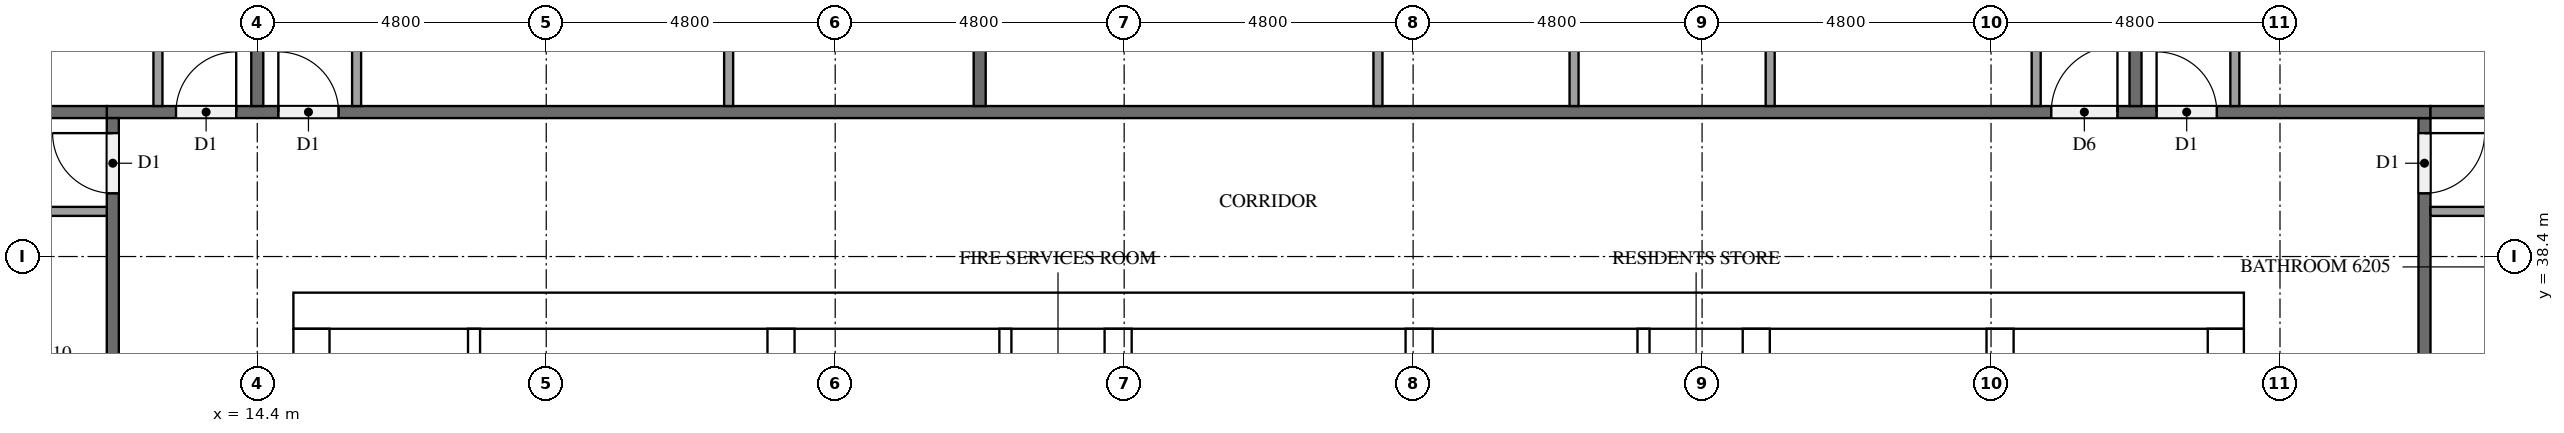
"""IFC4 building model, lengths in metres.
Left out: names, types, materials, properties, quantities, classifications, styles, units other than length and angle.
Written with IfcOpenShell. Run it as: python <this file> out.ifc"""

import sys

from ifc_helpers import new_model, si_unit, direction, frame, frame_2d, origin, place, context, subcontext, project, spatial, rectangle, extrude, element, fill, save


model = new_model("IFC4")
c1 = context("Model", 3, precision=1e-05, world=origin(), true_north=direction((0.0, 1.0)))
c2 = subcontext(c1, "Body", "Model", "MODEL_VIEW")
j1 = project(units=[si_unit("LENGTHUNIT", "METRE"), si_unit("PLANEANGLEUNIT", "RADIAN")], contexts=[c1])
p1 = place(None, origin())
s1 = spatial("IfcSite", under=j1, at=p1, CompositionType="ELEMENT")
p2 = place(p1, origin())
s2 = spatial("IfcBuilding", under=s1, at=p2, CompositionType="ELEMENT")
p3 = place(p2, frame((0.0, 0.0, 238.7)))
s3 = spatial("IfcBuildingStorey", under=s2, at=p3, CompositionType="ELEMENT", Elevation=238.7)
p4 = place(p3, frame((15.0, 37.5, 0.0), z_axis=(0.0, 0.0, 1.0), x_axis=(1.0, 0.0, 0.0)))
e1 = element("IfcWall", 1, at=p4, inside=s3, PredefinedType="SHEAR", context=c2, shape_type="SweptSolid", body=[
    extrude(rectangle(XDim=32.4, YDim=0.6, at=frame_2d((16.2, 0.0))), origin(), (0.0, 0.0, 1.0), 3.2),
])
p5 = place(p4, frame((15.3, 0.0, 0.0)))
e2 = element("IfcOpeningElement", 2, at=p5, cuts=e1, PredefinedType="OPENING", context=c2, shape_type="SweptSolid", body=[
    extrude(rectangle(XDim=1.8, YDim=2.1, at=frame_2d((0.9, 1.05))), frame((0.0, 0.31, 0.0), z_axis=(0.0, -1.0, 0.0), x_axis=(1.0, 0.0, 0.0)), (0.0, 0.0, 1.0), 0.62),
])
p6 = place(p4, frame((1.25, 0.0, 0.0)))
e3 = element("IfcOpeningElement", 3, at=p6, cuts=e1, PredefinedType="OPENING", context=c2, shape_type="SweptSolid", body=[
    extrude(rectangle(XDim=1.0, YDim=2.1, at=frame_2d((0.5, 1.05))), frame((0.0, 0.31, 0.0), z_axis=(0.0, -1.0, 0.0), x_axis=(1.0, 0.0, 0.0)), (0.0, 0.0, 1.0), 0.62),
])
p7 = place(p4, frame((4.988, 0.0, 0.0)))
e4 = element("IfcOpeningElement", 4, at=p7, cuts=e1, PredefinedType="OPENING", context=c2, shape_type="SweptSolid", body=[
    extrude(rectangle(XDim=1.0, YDim=2.1, at=frame_2d((0.5, 1.05))), frame((0.0, 0.31, 0.0), z_axis=(0.0, -1.0, 0.0), x_axis=(1.0, 0.0, 0.0)), (0.0, 0.0, 1.0), 0.62),
])
p8 = place(p3, frame((15.3, 15.6, 0.0), z_axis=(0.0, 0.0, 1.0), x_axis=(0.0, 1.0, 0.0)))
e5 = element("IfcWall", 5, at=p8, inside=s3, PredefinedType="SHEAR", context=c2, shape_type="SweptSolid", body=[
    extrude(rectangle(XDim=21.6, YDim=0.6, at=frame_2d((10.8, 0.0))), origin(), (0.0, 0.0, 1.0), 3.2),
])
p9 = place(p8, frame((5.16, 0.0, 0.0)))
e6 = element("IfcOpeningElement", 6, at=p9, cuts=e5, PredefinedType="OPENING", context=c2, shape_type="SweptSolid", body=[
    extrude(rectangle(XDim=1.2, YDim=2.1, at=frame_2d((0.6, 1.05))), frame((0.0, 0.31, 0.0), z_axis=(0.0, -1.0, 0.0), x_axis=(1.0, 0.0, 0.0)), (0.0, 0.0, 1.0), 0.62),
])
p10 = place(p3, frame((47.1, 15.6, 0.0), z_axis=(0.0, 0.0, 1.0), x_axis=(0.0, 1.0, 0.0)))
e7 = element("IfcWall", 7, at=p10, inside=s3, PredefinedType="SHEAR", context=c2, shape_type="SweptSolid", body=[
    extrude(rectangle(XDim=21.6, YDim=0.6, at=frame_2d((10.8, 0.0))), origin(), (0.0, 0.0, 1.0), 3.2),
])
p11 = place(p10, frame((10.5, 0.0, 0.0)))
e8 = element("IfcOpeningElement", 8, at=p11, cuts=e7, PredefinedType="OPENING", context=c2, shape_type="SweptSolid", body=[
    extrude(rectangle(XDim=1.2, YDim=2.1, at=frame_2d((0.6, 1.05))), frame((0.0, 0.31, 0.0), z_axis=(0.0, -1.0, 0.0), x_axis=(1.0, 0.0, 0.0)), (0.0, 0.0, 1.0), 0.62),
])
p12 = place(p3, frame((23.1, 15.6, 0.0), z_axis=(0.0, 0.0, 1.0), x_axis=(0.0, 1.0, 0.0)))
e9 = element("IfcWall", 9, at=p12, inside=s3, PredefinedType="SHEAR", context=c2, shape_type="SweptSolid", body=[
    extrude(rectangle(XDim=21.6, YDim=0.45, at=frame_2d((10.8, 0.0))), origin(), (0.0, 0.0, 1.0), 3.2),
])
p13 = place(p3, frame((39.3, 27.75, 0.0), z_axis=(0.0, 0.0, 1.0), x_axis=(0.0, 1.0, 0.0)))
e10 = element("IfcWall", 10, at=p13, inside=s3, PredefinedType="SHEAR", context=c2, shape_type="SweptSolid", body=[
    extrude(rectangle(XDim=9.45, YDim=0.45, at=frame_2d((4.725, 0.0))), origin(), (0.0, 0.0, 1.0), 3.2),
])
p14 = place(p3, frame((43.35, 27.75, 0.0), z_axis=(0.0, 0.0, 1.0), x_axis=(0.0, 1.0, 0.0)))
e11 = element("IfcWall", 11, at=p14, inside=s3, PredefinedType="SHEAR", context=c2, shape_type="SweptSolid", body=[
    extrude(rectangle(XDim=9.45, YDim=0.45, at=frame_2d((4.725, 0.0))), origin(), (0.0, 0.0, 1.0), 3.2),
])
p15 = place(p14, frame((7.65, 0.0, 0.0)))
e12 = element("IfcOpeningElement", 12, at=p15, cuts=e11, PredefinedType="OPENING", context=c2, shape_type="SweptSolid", body=[
    extrude(rectangle(XDim=1.2, YDim=2.1, at=frame_2d((0.6, 1.05))), frame((0.0, 0.235, 0.0), z_axis=(0.0, -1.0, 0.0), x_axis=(1.0, 0.0, 0.0)), (0.0, 0.0, 1.0), 0.47),
])
for number, where, z_axis, x_axis in (
    (13, (28.7, 33.775, 0.0), (0.0, 0.0, 1.0), (0.0, 1.0, 0.0)),
    (14, (33.7, 33.775, 0.0), (0.0, 0.0, 1.0), (0.0, 1.0, 0.0)),
):
    element("IfcWall", number, at=place(p3, frame(where, z_axis=z_axis, x_axis=x_axis)), inside=s3, PredefinedType="SHEAR", context=c2, shape_type="SweptSolid", body=[
        extrude(rectangle(XDim=3.425, YDim=0.45, at=frame_2d((1.712, 0.0))), origin(), (0.0, 0.0, 1.0), 3.2),
    ])
p16 = place(p3, frame((18.001, 31.475, 0.0), z_axis=(0.0, 0.0, 1.0), x_axis=(0.0, 1.0, 0.0)))
e15 = element("IfcWall", 15, at=p16, inside=s3, PredefinedType="PARTITIONING", context=c2, shape_type="SweptSolid", body=[
    extrude(rectangle(XDim=5.725, YDim=0.2, at=frame_2d((2.862, 0.0))), origin(), (0.0, 0.0, 1.0), 3.2),
])
for number, where, z_axis, x_axis in (
    (16, (26.827, 33.775, 0.0), (0.0, 0.0, 1.0), (0.0, 1.0, 0.0)),
    (17, (37.427, 33.775, 0.0), (0.0, 0.0, 1.0), (0.0, 1.0, 0.0)),
):
    element("IfcWall", number, at=place(p3, frame(where, z_axis=z_axis, x_axis=x_axis)), inside=s3, PredefinedType="PARTITIONING", context=c2, shape_type="SweptSolid", body=[
        extrude(rectangle(XDim=3.425, YDim=0.2, at=frame_2d((1.712, 0.0))), origin(), (0.0, 0.0, 1.0), 3.2),
    ])
p17 = place(p3, frame((50.4, 40.7, 0.0), z_axis=(0.0, 0.0, 1.0), x_axis=(0.0, -1.0, 0.0)))
e18 = element("IfcWall", 18, at=p17, inside=s3, PredefinedType="PARTITIONING", context=c2, shape_type="SweptSolid", body=[
    extrude(rectangle(XDim=28.6, YDim=0.2, at=frame_2d((14.3, 0.0))), origin(), (0.0, 0.0, 1.0), 3.2),
])
p18 = place(p17, frame((27.3, 0.0, 0.0)))
e19 = element("IfcOpeningElement", 19, at=p18, cuts=e18, PredefinedType="OPENING", context=c2, shape_type="SweptSolid", body=[
    extrude(rectangle(XDim=1.1, YDim=2.1, at=frame_2d((0.55, 1.05))), frame((0.0, 0.11, 0.0), z_axis=(0.0, -1.0, 0.0), x_axis=(1.0, 0.0, 0.0)), (0.0, 0.0, 1.0), 0.22),
])
p19 = place(p17, frame((0.25, 0.0, 0.0)))
e20 = element("IfcOpeningElement", 20, at=p19, cuts=e18, PredefinedType="OPENING", context=c2, shape_type="SweptSolid", body=[
    extrude(rectangle(XDim=1.0, YDim=2.1, at=frame_2d((0.5, 1.05))), frame((0.0, 0.11, 0.0), z_axis=(0.0, -1.0, 0.0), x_axis=(1.0, 0.0, 0.0)), (0.0, 0.0, 1.0), 0.22),
])
p20 = place(p3, frame((11.9, 40.8, 0.0), z_axis=(0.0, 0.0, 1.0), x_axis=(1.0, 0.0, 0.0)))
e21 = element("IfcWall", 21, at=p20, inside=s3, PredefinedType="PARTITIONING", context=c2, shape_type="SweptSolid", body=[
    extrude(rectangle(XDim=38.6, YDim=0.2, at=frame_2d((19.3, 0.0))), origin(), (0.0, 0.0, 1.0), 3.2),
])
p21 = place(p20, frame((34.05, 0.0, 0.0)))
e22 = element("IfcOpeningElement", 22, at=p21, cuts=e21, PredefinedType="OPENING", context=c2, shape_type="SweptSolid", body=[
    extrude(rectangle(XDim=1.0, YDim=2.1, at=frame_2d((0.5, 1.05))), frame((0.0, 0.11, 0.0), z_axis=(0.0, -1.0, 0.0), x_axis=(1.0, 0.0, 0.0)), (0.0, 0.0, 1.0), 0.22),
])
p22 = place(p20, frame((32.3, 0.0, 0.0)))
e23 = element("IfcOpeningElement", 23, at=p22, cuts=e21, PredefinedType="OPENING", context=c2, shape_type="SweptSolid", body=[
    extrude(rectangle(XDim=1.1, YDim=2.1, at=frame_2d((0.55, 1.05))), frame((0.0, 0.11, 0.0), z_axis=(0.0, -1.0, 0.0), x_axis=(1.0, 0.0, 0.0)), (0.0, 0.0, 1.0), 0.22),
])
p23 = place(p20, frame((2.85, 0.0, 0.0)))
e24 = element("IfcOpeningElement", 24, at=p23, cuts=e21, PredefinedType="OPENING", context=c2, shape_type="SweptSolid", body=[
    extrude(rectangle(XDim=1.0, YDim=2.1, at=frame_2d((0.5, 1.05))), frame((0.0, 0.11, 0.0), z_axis=(0.0, -1.0, 0.0), x_axis=(1.0, 0.0, 0.0)), (0.0, 0.0, 1.0), 0.22),
])
p24 = place(p20, frame((1.15, 0.0, 0.0)))
e25 = element("IfcOpeningElement", 25, at=p24, cuts=e21, PredefinedType="OPENING", context=c2, shape_type="SweptSolid", body=[
    extrude(rectangle(XDim=1.0, YDim=2.1, at=frame_2d((0.5, 1.05))), frame((0.0, 0.11, 0.0), z_axis=(0.0, -1.0, 0.0), x_axis=(1.0, 0.0, 0.0)), (0.0, 0.0, 1.0), 0.22),
])
p25 = place(p3, frame((12.0, 12.1, 0.0), z_axis=(0.0, 0.0, 1.0), x_axis=(0.0, 1.0, 0.0)))
e26 = element("IfcWall", 26, at=p25, inside=s3, PredefinedType="PARTITIONING", context=c2, shape_type="SweptSolid", body=[
    extrude(rectangle(XDim=28.6, YDim=0.2, at=frame_2d((14.3, 0.0))), origin(), (0.0, 0.0, 1.0), 3.2),
])
p26 = place(p25, frame((27.35, 0.0, 0.0)))
e27 = element("IfcOpeningElement", 27, at=p26, cuts=e26, PredefinedType="OPENING", context=c2, shape_type="SweptSolid", body=[
    extrude(rectangle(XDim=1.0, YDim=2.1, at=frame_2d((0.5, 1.05))), frame((0.0, 0.11, 0.0), z_axis=(0.0, -1.0, 0.0), x_axis=(1.0, 0.0, 0.0)), (0.0, 0.0, 1.0), 0.22),
])
p27 = place(p25, frame((17.75, 0.0, 0.0)))
e28 = element("IfcOpeningElement", 28, at=p27, cuts=e26, PredefinedType="OPENING", context=c2, shape_type="SweptSolid", body=[
    extrude(rectangle(XDim=1.0, YDim=2.1, at=frame_2d((0.5, 1.05))), frame((0.0, 0.11, 0.0), z_axis=(0.0, -1.0, 0.0), x_axis=(1.0, 0.0, 0.0)), (0.0, 0.0, 1.0), 0.22),
])
p28 = place(p25, frame((3.35, 0.0, 0.0)))
e29 = element("IfcOpeningElement", 29, at=p28, cuts=e26, PredefinedType="OPENING", context=c2, shape_type="SweptSolid", body=[
    extrude(rectangle(XDim=1.0, YDim=2.1, at=frame_2d((0.5, 1.05))), frame((0.0, 0.11, 0.0), z_axis=(0.0, -1.0, 0.0), x_axis=(1.0, 0.0, 0.0)), (0.0, 0.0, 1.0), 0.22),
])
p29 = place(p3, frame((50.5, 40.8, 0.0), z_axis=(0.0, 0.0, 1.0), x_axis=(1.0, 0.0, 0.0)))
e30 = element("IfcWall", 30, at=p29, inside=s3, PredefinedType="PARTITIONING", context=c2, shape_type="SweptSolid", body=[
    extrude(rectangle(XDim=7.0, YDim=0.2, at=frame_2d((3.5, 0.0))), origin(), (0.0, 0.0, 1.0), 3.2),
])
for number, where, z_axis, x_axis in (
    (31, (45.6, 52.7, 0.0), (0.0, 0.0, 1.0), (0.0, -1.0, 0.0)),
    (32, (26.4, 52.7, 0.0), (0.0, 0.0, 1.0), (0.0, -1.0, 0.0)),
):
    element("IfcWall", number, at=place(p3, frame(where, z_axis=z_axis, x_axis=x_axis)), inside=s3, PredefinedType="PARTITIONING", context=c2, shape_type="SweptSolid", body=[
        extrude(rectangle(XDim=11.8, YDim=0.2, at=frame_2d((5.9, 0.0))), origin(), (0.0, 0.0, 1.0), 3.2),
    ])
p30 = place(p3, frame((14.4, 52.525, 0.0), z_axis=(0.0, 0.0, 1.0), x_axis=(0.0, -1.0, 0.0)))
e33 = element("IfcWall", 33, at=p30, inside=s3, PredefinedType="PARTITIONING", context=c2, shape_type="SweptSolid", body=[
    extrude(rectangle(XDim=11.625, YDim=0.2, at=frame_2d((5.812, 0.0))), origin(), (0.0, 0.0, 1.0), 3.2),
])
p31 = place(p3, frame((0.1, 40.8, 0.0), z_axis=(0.0, 0.0, 1.0), x_axis=(1.0, 0.0, 0.0)))
e34 = element("IfcWall", 34, at=p31, inside=s3, PredefinedType="PARTITIONING", context=c2, shape_type="SweptSolid", body=[
    extrude(rectangle(XDim=11.8, YDim=0.2, at=frame_2d((5.9, 0.0))), origin(), (0.0, 0.0, 1.0), 3.2),
])
p32 = place(p3, frame((50.5, 39.15, 0.0), z_axis=(0.0, 0.0, 1.0), x_axis=(1.0, 0.0, 0.0)))
e35 = element("IfcWall", 35, at=p32, inside=s3, PredefinedType="PARTITIONING", context=c2, shape_type="SweptSolid", body=[
    extrude(rectangle(XDim=1.925, YDim=0.15, at=frame_2d((0.962, 0.0))), origin(), (0.0, 0.0, 1.0), 3.2),
])
p33 = place(p3, frame((47.25, 40.9, 0.0), z_axis=(0.0, 0.0, 1.0), x_axis=(0.0, 1.0, 0.0)))
e36 = element("IfcWall", 36, at=p33, inside=s3, PredefinedType="PARTITIONING", context=c2, shape_type="SweptSolid", body=[
    extrude(rectangle(XDim=4.325, YDim=0.15, at=frame_2d((2.163, 0.0))), origin(), (0.0, 0.0, 1.0), 3.2),
])
for number, where, z_axis, x_axis in (
    (37, (39.531, 40.9, 0.0), (0.0, 0.0, 1.0), (0.0, 1.0, 0.0)),
    (38, (36.273, 40.9, 0.0), (0.0, 0.0, 1.0), (0.0, 1.0, 0.0)),
    (39, (33.016, 40.9, 0.0), (0.0, 0.0, 1.0), (0.0, 1.0, 0.0)),
):
    element("IfcWall", number, at=place(p3, frame(where, z_axis=z_axis, x_axis=x_axis)), inside=s3, PredefinedType="PARTITIONING", context=c2, shape_type="SweptSolid", body=[
        extrude(rectangle(XDim=3.875, YDim=0.15, at=frame_2d((1.938, 0.0))), origin(), (0.0, 0.0, 1.0), 3.2),
    ])
p34 = place(p3, frame((43.95, 40.9, 0.0), z_axis=(0.0, 0.0, 1.0), x_axis=(0.0, 1.0, 0.0)))
e40 = element("IfcWall", 40, at=p34, inside=s3, PredefinedType="PARTITIONING", context=c2, shape_type="SweptSolid", body=[
    extrude(rectangle(XDim=4.025, YDim=0.15, at=frame_2d((2.013, 0.0))), origin(), (0.0, 0.0, 1.0), 3.2),
])
p35 = place(p3, frame((22.23, 40.9, 0.0), z_axis=(0.0, 0.0, 1.0), x_axis=(0.0, 1.0, 0.0)))
e41 = element("IfcWall", 41, at=p35, inside=s3, PredefinedType="PARTITIONING", context=c2, shape_type="SweptSolid", body=[
    extrude(rectangle(XDim=3.875, YDim=0.15, at=frame_2d((1.938, 0.0))), origin(), (0.0, 0.0, 1.0), 3.2),
])
p36 = place(p3, frame((16.05, 40.9, 0.0), z_axis=(0.0, 0.0, 1.0), x_axis=(0.0, 1.0, 0.0)))
e42 = element("IfcWall", 42, at=p36, inside=s3, PredefinedType="PARTITIONING", context=c2, shape_type="SweptSolid", body=[
    extrude(rectangle(XDim=4.025, YDim=0.15, at=frame_2d((2.013, 0.0))), origin(), (0.0, 0.0, 1.0), 3.2),
])
p37 = place(p3, frame((12.75, 40.9, 0.0), z_axis=(0.0, 0.0, 1.0), x_axis=(0.0, 1.0, 0.0)))
e43 = element("IfcWall", 43, at=p37, inside=s3, PredefinedType="PARTITIONING", context=c2, shape_type="SweptSolid", body=[
    extrude(rectangle(XDim=3.725, YDim=0.15, at=frame_2d((1.863, 0.0))), origin(), (0.0, 0.0, 1.0), 3.2),
])
p38 = place(p3, frame((11.9, 39.15, 0.0), z_axis=(0.0, 0.0, 1.0), x_axis=(-1.0, 0.0, 0.0)))
e44 = element("IfcWall", 44, at=p38, inside=s3, PredefinedType="PARTITIONING", context=c2, shape_type="SweptSolid", body=[
    extrude(rectangle(XDim=3.425, YDim=0.15, at=frame_2d((1.712, 0.0))), origin(), (0.0, 0.0, 1.0), 3.2),
])
p39 = place(p5, origin())
e45 = element("IfcDoor", 45, at=p39, inside=s3, OperationType="DOUBLE_DOOR_SINGLE_SWING", PredefinedType="DOOR", context=c2, shape_type="SweptSolid", body=[
    extrude(rectangle(XDim=1.8, YDim=2.1, at=frame_2d((0.9, 1.05))), frame((0.0, 0.025, 0.0), z_axis=(0.0, -1.0, 0.0), x_axis=(1.0, 0.0, 0.0)), (0.0, 0.0, 1.0), 0.05),
])
fill(e2, e45)
p40 = place(p6, origin())
e46 = element("IfcDoor", 46, at=p40, inside=s3, OperationType="SINGLE_SWING_LEFT", PredefinedType="DOOR", context=c2, shape_type="SweptSolid", body=[
    extrude(rectangle(XDim=1.0, YDim=2.1, at=frame_2d((0.5, 1.05))), frame((0.0, 0.025, 0.0), z_axis=(0.0, -1.0, 0.0), x_axis=(1.0, 0.0, 0.0)), (0.0, 0.0, 1.0), 0.05),
])
fill(e3, e46)
p41 = place(p7, origin())
e47 = element("IfcDoor", 47, at=p41, inside=s3, OperationType="SINGLE_SWING_RIGHT", PredefinedType="DOOR", context=c2, shape_type="SweptSolid", body=[
    extrude(rectangle(XDim=1.0, YDim=2.1, at=frame_2d((0.5, 1.05))), frame((0.0, 0.025, 0.0), z_axis=(0.0, -1.0, 0.0), x_axis=(1.0, 0.0, 0.0)), (0.0, 0.0, 1.0), 0.05),
])
fill(e4, e47)
p42 = place(p19, origin())
e48 = element("IfcDoor", 48, at=p42, inside=s3, OperationType="SINGLE_SWING_LEFT", PredefinedType="DOOR", context=c2, shape_type="SweptSolid", body=[
    extrude(rectangle(XDim=1.0, YDim=2.1, at=frame_2d((0.5, 1.05))), frame((0.0, 0.025, 0.0), z_axis=(0.0, -1.0, 0.0), x_axis=(1.0, 0.0, 0.0)), (0.0, 0.0, 1.0), 0.05),
])
fill(e20, e48)
p43 = place(p21, origin())
e49 = element("IfcDoor", 49, at=p43, inside=s3, OperationType="SINGLE_SWING_LEFT", PredefinedType="DOOR", context=c2, shape_type="SweptSolid", body=[
    extrude(rectangle(XDim=1.0, YDim=2.1, at=frame_2d((0.5, 1.05))), frame((0.0, 0.025, 0.0), z_axis=(0.0, -1.0, 0.0), x_axis=(1.0, 0.0, 0.0)), (0.0, 0.0, 1.0), 0.05),
])
fill(e22, e49)
p44 = place(p22, origin())
e50 = element("IfcDoor", 50, at=p44, inside=s3, OperationType="SINGLE_SWING_RIGHT", PredefinedType="DOOR", context=c2, shape_type="SweptSolid", body=[
    extrude(rectangle(XDim=1.1, YDim=2.1, at=frame_2d((0.55, 1.05))), frame((0.0, 0.025, 0.0), z_axis=(0.0, -1.0, 0.0), x_axis=(1.0, 0.0, 0.0)), (0.0, 0.0, 1.0), 0.05),
])
fill(e23, e50)
p45 = place(p23, origin())
e51 = element("IfcDoor", 51, at=p45, inside=s3, OperationType="SINGLE_SWING_LEFT", PredefinedType="DOOR", context=c2, shape_type="SweptSolid", body=[
    extrude(rectangle(XDim=1.0, YDim=2.1, at=frame_2d((0.5, 1.05))), frame((0.0, 0.025, 0.0), z_axis=(0.0, -1.0, 0.0), x_axis=(1.0, 0.0, 0.0)), (0.0, 0.0, 1.0), 0.05),
])
fill(e24, e51)
p46 = place(p24, origin())
e52 = element("IfcDoor", 52, at=p46, inside=s3, OperationType="SINGLE_SWING_RIGHT", PredefinedType="DOOR", context=c2, shape_type="SweptSolid", body=[
    extrude(rectangle(XDim=1.0, YDim=2.1, at=frame_2d((0.5, 1.05))), frame((0.0, 0.025, 0.0), z_axis=(0.0, -1.0, 0.0), x_axis=(1.0, 0.0, 0.0)), (0.0, 0.0, 1.0), 0.05),
])
fill(e25, e52)
p47 = place(p26, origin())
e53 = element("IfcDoor", 53, at=p47, inside=s3, OperationType="SINGLE_SWING_RIGHT", PredefinedType="DOOR", context=c2, shape_type="SweptSolid", body=[
    extrude(rectangle(XDim=1.0, YDim=2.1, at=frame_2d((0.5, 1.05))), frame((0.0, 0.025, 0.0), z_axis=(0.0, -1.0, 0.0), x_axis=(1.0, 0.0, 0.0)), (0.0, 0.0, 1.0), 0.05),
])
fill(e27, e53)
save(model, sys.argv[1])
